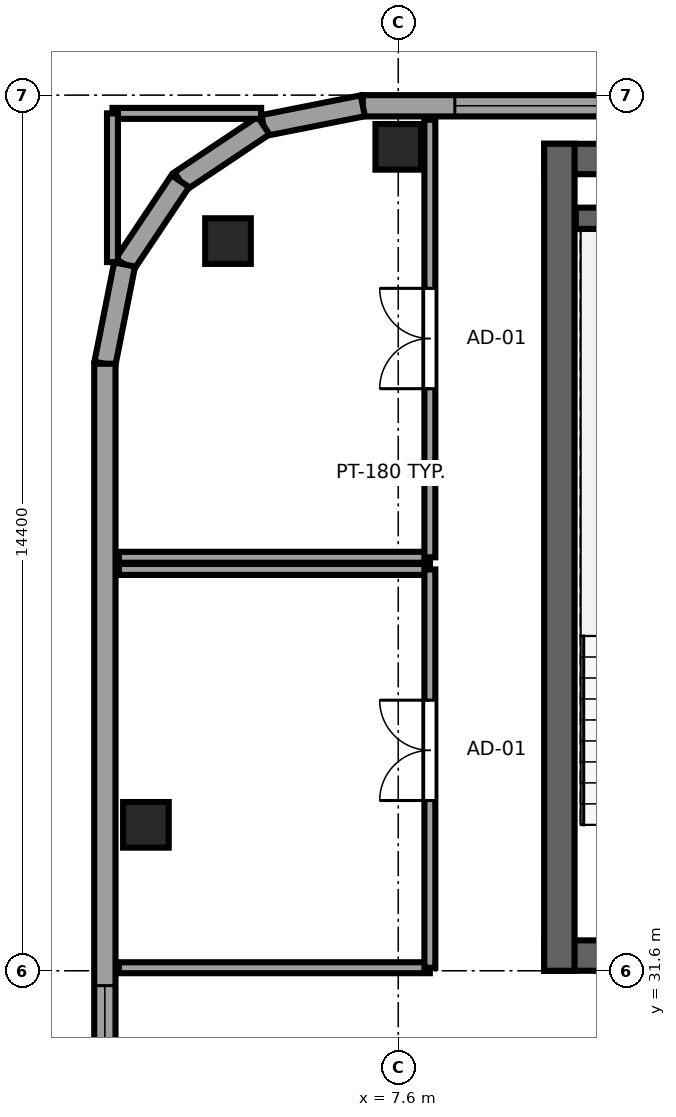
"""IFC4 building model, lengths in metres.
Left out: names, types, materials, properties, quantities, classifications, styles, units other than length and angle.
Written with IfcOpenShell. Run it as: python <this file> out.ifc"""

import sys

from ifc_helpers import new_model, si_unit, direction, frame, frame_2d, origin, origin_2d, place, context, subcontext, project, spatial, rectangle, extrude, source, transform, mapped, element, fill, save


model = new_model("IFC4")
c1 = context("Model", 3, precision=1e-05, world=origin(), true_north=direction((0.0, 1.0)))
c2 = subcontext(c1, "Body", "Model", "MODEL_VIEW")
j1 = project(units=[si_unit("LENGTHUNIT", "METRE"), si_unit("PLANEANGLEUNIT", "RADIAN")], contexts=[c1])
p1 = place(None, origin())
s1 = spatial("IfcSite", under=j1, at=p1, CompositionType="ELEMENT")
p2 = place(p1, origin())
s2 = spatial("IfcBuilding", under=s1, at=p2, CompositionType="ELEMENT")
p3 = place(p2, frame((0.0, 0.0, 213.25)))
s3 = spatial("IfcBuildingStorey", under=s2, at=p3, CompositionType="ELEMENT", Elevation=213.25)
p4 = place(p3, frame((10.0, 31.85, 0.0), z_axis=(0.0, 0.0, 1.0), x_axis=(1.0, 0.0, 0.0)))
e1 = element("IfcWall", 1, at=p4, inside=s3, PredefinedType="SHEAR", context=c2, shape_type="SweptSolid", body=[
    extrude(rectangle(XDim=26.0, YDim=0.5, at=frame_2d((13.0, 0.0))), origin(), (0.0, 0.0, 1.0), 3.55),
])
p5 = place(p4, frame((7.45, 0.0, 0.0), z_axis=(0.0, 0.0, 1.0), x_axis=(-1.0, 0.0, 0.0)))
e2 = element("IfcOpeningElement", 2, at=p5, cuts=e1, PredefinedType="OPENING", context=c2, shape_type="SweptSolid", body=[
    extrude(rectangle(XDim=1.5, YDim=2.04, at=frame_2d((0.75, 1.02))), frame((0.0, 0.26, 0.0), z_axis=(0.0, -1.0, 0.0), x_axis=(1.0, 0.0, 0.0)), (0.0, 0.0, 1.0), 0.52),
])
p6 = place(p4, frame((13.75, 0.0, 0.0), z_axis=(0.0, 0.0, 1.0), x_axis=(-1.0, 0.0, 0.0)))
e3 = element("IfcOpeningElement", 3, at=p6, cuts=e1, PredefinedType="OPENING", context=c2, shape_type="SweptSolid", body=[
    extrude(rectangle(XDim=1.5, YDim=2.04, at=frame_2d((0.75, 1.02))), frame((0.0, 0.26, 0.0), z_axis=(0.0, -1.0, 0.0), x_axis=(1.0, 0.0, 0.0)), (0.0, 0.0, 1.0), 0.52),
])
p7 = place(p4, frame((20.05, 0.0, 0.0), z_axis=(0.0, 0.0, 1.0), x_axis=(-1.0, 0.0, 0.0)))
e4 = element("IfcOpeningElement", 4, at=p7, cuts=e1, PredefinedType="OPENING", context=c2, shape_type="SweptSolid", body=[
    extrude(rectangle(XDim=1.5, YDim=2.04, at=frame_2d((0.75, 1.02))), frame((0.0, 0.26, 0.0), z_axis=(0.0, -1.0, 0.0), x_axis=(1.0, 0.0, 0.0)), (0.0, 0.0, 1.0), 0.52),
])
p8 = place(p3, frame((10.0, 44.95, 0.0), z_axis=(0.0, 0.0, 1.0), x_axis=(1.0, 0.0, 0.0)))
e5 = element("IfcWall", 5, at=p8, inside=s3, PredefinedType="SHEAR", context=c2, shape_type="SweptSolid", body=[
    extrude(rectangle(XDim=26.0, YDim=0.5, at=frame_2d((13.0, 0.0))), origin(), (0.0, 0.0, 1.0), 3.55),
])
p9 = place(p3, frame((10.25, 31.6, 0.0), z_axis=(0.0, 0.0, 1.0), x_axis=(0.0, 1.0, 0.0)))
e6 = element("IfcWall", 6, at=p9, inside=s3, PredefinedType="SHEAR", context=c2, shape_type="SweptSolid", body=[
    extrude(rectangle(XDim=13.6, YDim=0.5, at=frame_2d((6.8, 0.0))), origin(), (0.0, 0.0, 1.0), 3.55),
])
p10 = place(p3, frame((10.52, 43.975, 0.0), z_axis=(0.0, 0.0, 1.0), x_axis=(1.0, 0.0, 0.0)))
e7 = element("IfcWall", 7, at=p10, inside=s3, PredefinedType="SHEAR", context=c2, shape_type="SweptSolid", body=[
    extrude(rectangle(XDim=3.6, YDim=0.35, at=frame_2d((1.8, 0.0))), origin(), (0.0, 0.0, 1.0), 3.55),
])
m1 = source(origin(), c2, "Body", "SweptSolid", [
    extrude(rectangle(XDim=0.75, YDim=0.75, at=origin_2d()), origin(), (0.0, 0.0, 1.0), 3.55),
])
for number, where, z_axis, x_axis in (
    (8, (4.8, 43.6, 0.0), (0.0, 0.0, 1.0), (1.0, 0.0, 0.0)),
    (9, (7.6, 45.15, 0.0), (0.0, 0.0, 1.0), (1.0, 0.0, 0.0)),
    (10, (3.45, 34.0, 0.0), (0.0, 0.0, 1.0), (1.0, 0.0, 0.0)),
):
    element("IfcColumn", number, at=place(p3, frame(where, z_axis=z_axis, x_axis=x_axis)), inside=s3, PredefinedType="COLUMN", context=c2, shape_type="MappedRepresentation", body=[
        mapped(m1, transform((0.0, 0.0, 0.0), x_axis=(1.0, 0.0, 0.0), y_axis=(0.0, 1.0, 0.0), z_axis=(0.0, 0.0, 1.0), scale=1.0)),
    ])
p11 = place(p3, frame((35.383, 45.825, 0.0), z_axis=(0.0, 0.0, 1.0), x_axis=(-1.0, 0.0, 0.0)))
e11 = element("IfcWall", 11, at=p11, inside=s3, PredefinedType="SOLIDWALL", context=c2, shape_type="SweptSolid", body=[
    extrude(rectangle(XDim=28.366, YDim=0.35, at=frame_2d((14.183, 0.0))), origin(), (0.0, 0.0, 1.0), 3.37),
])
p12 = place(p11, frame((1.514, 0.0, 0.68)))
e12 = element("IfcOpeningElement", 12, at=p12, cuts=e11, PredefinedType="OPENING", context=c2, shape_type="SweptSolid", body=[
    extrude(rectangle(XDim=2.7, YDim=1.95, at=frame_2d((1.35, 0.975))), frame((0.0, 0.185, 0.0), z_axis=(0.0, -1.0, 0.0), x_axis=(1.0, 0.0, 0.0)), (0.0, 0.0, 1.0), 0.37),
])
p13 = place(p11, frame((6.041, 0.0, 0.68)))
e13 = element("IfcOpeningElement", 13, at=p13, cuts=e11, PredefinedType="OPENING", context=c2, shape_type="SweptSolid", body=[
    extrude(rectangle(XDim=2.7, YDim=1.95, at=frame_2d((1.35, 0.975))), frame((0.0, 0.185, 0.0), z_axis=(0.0, -1.0, 0.0), x_axis=(1.0, 0.0, 0.0)), (0.0, 0.0, 1.0), 0.37),
])
p14 = place(p11, frame((10.569, 0.0, 0.68)))
e14 = element("IfcOpeningElement", 14, at=p14, cuts=e11, PredefinedType="OPENING", context=c2, shape_type="SweptSolid", body=[
    extrude(rectangle(XDim=2.7, YDim=1.95, at=frame_2d((1.35, 0.975))), frame((0.0, 0.185, 0.0), z_axis=(0.0, -1.0, 0.0), x_axis=(1.0, 0.0, 0.0)), (0.0, 0.0, 1.0), 0.37),
])
p15 = place(p11, frame((15.097, 0.0, 0.68)))
e15 = element("IfcOpeningElement", 15, at=p15, cuts=e11, PredefinedType="OPENING", context=c2, shape_type="SweptSolid", body=[
    extrude(rectangle(XDim=2.7, YDim=1.95, at=frame_2d((1.35, 0.975))), frame((0.0, 0.185, 0.0), z_axis=(0.0, -1.0, 0.0), x_axis=(1.0, 0.0, 0.0)), (0.0, 0.0, 1.0), 0.37),
])
p16 = place(p11, frame((19.624, 0.0, 0.68)))
e16 = element("IfcOpeningElement", 16, at=p16, cuts=e11, PredefinedType="OPENING", context=c2, shape_type="SweptSolid", body=[
    extrude(rectangle(XDim=2.7, YDim=1.95, at=frame_2d((1.35, 0.975))), frame((0.0, 0.185, 0.0), z_axis=(0.0, -1.0, 0.0), x_axis=(1.0, 0.0, 0.0)), (0.0, 0.0, 1.0), 0.37),
])
p17 = place(p11, frame((24.152, 0.0, 0.68)))
e17 = element("IfcOpeningElement", 17, at=p17, cuts=e11, PredefinedType="OPENING", context=c2, shape_type="SweptSolid", body=[
    extrude(rectangle(XDim=2.7, YDim=1.95, at=frame_2d((1.35, 0.975))), frame((0.0, 0.185, 0.0), z_axis=(0.0, -1.0, 0.0), x_axis=(1.0, 0.0, 0.0)), (0.0, 0.0, 1.0), 0.37),
])
p18 = place(p3, frame((7.017, 45.825, 0.0), z_axis=(0.0, 0.0, 1.0), x_axis=(-0.980788844421, -0.195072403631, 0.0)))
e18 = element("IfcWall", 18, at=p18, inside=s3, PredefinedType="SOLIDWALL", context=c2, shape_type="SweptSolid", body=[
    extrude(rectangle(XDim=1.665, YDim=0.35, at=frame_2d((0.832, 0.0))), origin(), (0.0, 0.0, 1.0), 3.37),
])
for number, where, z_axis, x_axis in (
    (19, (5.385, 45.5, 0.0), (0.0, 0.0, 1.0), (-0.832, -0.556, 0.0)),
    (20, (4.015, 44.585, 0.0), (0.0, 0.0, 1.0), (-0.556, -0.831, 0.0)),
):
    element("IfcWall", number, at=place(p3, frame(where, z_axis=z_axis, x_axis=x_axis)), inside=s3, PredefinedType="SOLIDWALL", context=c2, shape_type="SweptSolid", body=[
        extrude(rectangle(XDim=1.647, YDim=0.35, at=frame_2d((0.824, 0.0))), origin(), (0.0, 0.0, 1.0), 2.9),
    ])
p19 = place(p3, frame((3.1, 43.216, 0.0), z_axis=(0.0, 0.0, 1.0), x_axis=(-0.195044345786, -0.980794424524, 0.0)))
e21 = element("IfcWall", 21, at=p19, inside=s3, PredefinedType="SOLIDWALL", context=c2, shape_type="SweptSolid", body=[
    extrude(rectangle(XDim=1.665, YDim=0.35, at=frame_2d((0.833, 0.0))), origin(), (0.0, 0.0, 1.0), 3.37),
])
p20 = place(p3, frame((2.775, 41.583, 0.0), z_axis=(0.0, 0.0, 1.0), x_axis=(0.0, -1.0, 0.0)))
e22 = element("IfcWall", 22, at=p20, inside=s3, PredefinedType="SOLIDWALL", context=c2, shape_type="SweptSolid", body=[
    extrude(rectangle(XDim=34.566, YDim=0.35, at=frame_2d((17.283, 0.0))), origin(), (0.0, 0.0, 1.0), 3.37),
])
p21 = place(p20, frame((10.227, 0.0, 0.68)))
e23 = element("IfcOpeningElement", 23, at=p21, cuts=e22, PredefinedType="OPENING", context=c2, shape_type="SweptSolid", body=[
    extrude(rectangle(XDim=2.7, YDim=1.95, at=frame_2d((1.35, 0.975))), frame((0.0, 0.185, 0.0), z_axis=(0.0, -1.0, 0.0), x_axis=(1.0, 0.0, 0.0)), (0.0, 0.0, 1.0), 0.37),
])
p22 = place(p20, frame((22.189, 0.0, 0.68)))
e24 = element("IfcOpeningElement", 24, at=p22, cuts=e22, PredefinedType="OPENING", context=c2, shape_type="SweptSolid", body=[
    extrude(rectangle(XDim=2.7, YDim=1.95, at=frame_2d((1.35, 0.975))), frame((0.0, 0.185, 0.0), z_axis=(0.0, -1.0, 0.0), x_axis=(1.0, 0.0, 0.0)), (0.0, 0.0, 1.0), 0.37),
])
p23 = place(p20, frame((26.36, 0.0, 0.68)))
e25 = element("IfcOpeningElement", 25, at=p23, cuts=e22, PredefinedType="OPENING", context=c2, shape_type="SweptSolid", body=[
    extrude(rectangle(XDim=2.7, YDim=1.95, at=frame_2d((1.35, 0.975))), frame((0.0, 0.185, 0.0), z_axis=(0.0, -1.0, 0.0), x_axis=(1.0, 0.0, 0.0)), (0.0, 0.0, 1.0), 0.37),
])
p24 = place(p20, frame((29.48, 0.0, 0.68)))
e26 = element("IfcOpeningElement", 26, at=p24, cuts=e22, PredefinedType="OPENING", context=c2, shape_type="SweptSolid", body=[
    extrude(rectangle(XDim=2.7, YDim=1.95, at=frame_2d((1.35, 0.975))), frame((0.0, 0.185, 0.0), z_axis=(0.0, -1.0, 0.0), x_axis=(1.0, 0.0, 0.0)), (0.0, 0.0, 1.0), 0.37),
])
p25 = place(p20, frame((16.683, 0.0, 0.62)))
e27 = element("IfcOpeningElement", 27, at=p25, cuts=e22, PredefinedType="OPENING", context=c2, shape_type="SweptSolid", body=[
    extrude(rectangle(XDim=1.5, YDim=1.55, at=frame_2d((0.75, 0.775))), frame((0.0, 0.185, 0.0), z_axis=(0.0, -1.0, 0.0), x_axis=(1.0, 0.0, 0.0)), (0.0, 0.0, 1.0), 0.37),
])
for number, where, z_axis, x_axis in (
    (28, (3.005, 31.65, 0.0), (0.0, 0.0, 1.0), (1.0, 0.0, 0.0)),
    (29, (3.005, 38.2, 0.0), (0.0, 0.0, 1.0), (1.0, 0.0, 0.0)),
):
    element("IfcWall", number, at=place(p3, frame(where, z_axis=z_axis, x_axis=x_axis)), inside=s3, PredefinedType="PARTITIONING", context=c2, shape_type="SweptSolid", body=[
        extrude(rectangle(XDim=5.115, YDim=0.18, at=frame_2d((2.558, 0.0))), origin(), (0.0, 0.0, 1.0), 3.37),
    ])
p26 = place(p3, frame((8.12, 31.65, 0.0), z_axis=(0.0, 0.0, 1.0), x_axis=(0.0, 1.0, 0.0)))
e30 = element("IfcWall", 30, at=p26, inside=s3, PredefinedType="PARTITIONING", context=c2, shape_type="SweptSolid", body=[
    extrude(rectangle(XDim=6.55, YDim=0.18, at=frame_2d((3.275, 0.0))), origin(), (0.0, 0.0, 1.0), 3.37),
])
p27 = place(p26, frame((2.75, 0.0, 0.0)))
e31 = element("IfcOpeningElement", 31, at=p27, cuts=e30, PredefinedType="OPENING", context=c2, shape_type="SweptSolid", body=[
    extrude(rectangle(XDim=1.65, YDim=2.15, at=frame_2d((0.825, 1.075))), frame((0.0, 0.1, 0.0), z_axis=(0.0, -1.0, 0.0), x_axis=(1.0, 0.0, 0.0)), (0.0, 0.0, 1.0), 0.2),
])
p28 = place(p3, frame((3.005, 38.4, 0.0), z_axis=(0.0, 0.0, 1.0), x_axis=(1.0, 0.0, 0.0)))
e32 = element("IfcWall", 32, at=p28, inside=s3, PredefinedType="PARTITIONING", context=c2, shape_type="SweptSolid", body=[
    extrude(rectangle(XDim=5.115, YDim=0.18, at=frame_2d((2.558, 0.0))), origin(), (0.0, 0.0, 1.0), 3.37),
])
for number, where, z_axis, x_axis in (
    (33, (2.9, 45.7, 0.0), (0.0, 0.0, 1.0), (1.0, 0.0, 0.0)),
    (34, (2.9, 43.255, 0.0), (0.0, 0.0, 1.0), (0.0, 1.0, 0.0)),
):
    element("IfcWall", number, at=place(p3, frame(where, z_axis=z_axis, x_axis=x_axis)), inside=s3, PredefinedType="PARTITIONING", context=c2, shape_type="SweptSolid", body=[
        extrude(rectangle(XDim=2.445, YDim=0.18, at=frame_2d((1.223, 0.0))), origin(), (0.0, 0.0, 1.0), 3.37),
    ])
p29 = place(p3, frame((8.12, 38.4, 0.0), z_axis=(0.0, 0.0, 1.0), x_axis=(0.0, 1.0, 0.0)))
e35 = element("IfcWall", 35, at=p29, inside=s3, PredefinedType="PARTITIONING", context=c2, shape_type="SweptSolid", body=[
    extrude(rectangle(XDim=7.195, YDim=0.18, at=frame_2d((3.598, 0.0))), origin(), (0.0, 0.0, 1.0), 3.37),
])
p30 = place(p29, frame((2.772, 0.0, 0.0)))
e36 = element("IfcOpeningElement", 36, at=p30, cuts=e35, PredefinedType="OPENING", context=c2, shape_type="SweptSolid", body=[
    extrude(rectangle(XDim=1.65, YDim=2.15, at=frame_2d((0.825, 1.075))), frame((0.0, 0.1, 0.0), z_axis=(0.0, -1.0, 0.0), x_axis=(1.0, 0.0, 0.0)), (0.0, 0.0, 1.0), 0.2),
])
m2 = source(origin(), c2, "Body", "SweptSolid", [
    extrude(rectangle(XDim=2.7, YDim=1.95, at=frame_2d((1.35, 0.975))), frame((0.0, 0.09, 0.0), z_axis=(0.0, -1.0, 0.0), x_axis=(1.0, 0.0, 0.0)), (0.0, 0.0, 1.0), 0.06),
])
p31 = place(p17, origin())
e37 = element("IfcWindow", 37, at=p31, inside=s3, PartitioningType="TRIPLE_PANEL_HORIZONTAL", PredefinedType="WINDOW", context=c2, shape_type="MappedRepresentation", body=[
    mapped(m2, transform((0.0, 0.0, 0.0), x_axis=(1.0, 0.0, 0.0), y_axis=(0.0, 1.0, 0.0), z_axis=(0.0, 0.0, 1.0), scale=1.0)),
])
fill(e17, e37)
p32 = place(p21, origin())
e38 = element("IfcWindow", 38, at=p32, inside=s3, PartitioningType="TRIPLE_PANEL_HORIZONTAL", PredefinedType="WINDOW", context=c2, shape_type="MappedRepresentation", body=[
    mapped(m2, transform((0.0, 0.0, 0.0), x_axis=(1.0, 0.0, 0.0), y_axis=(0.0, 1.0, 0.0), z_axis=(0.0, 0.0, 1.0), scale=1.0)),
])
fill(e23, e38)
m3 = source(origin(), c2, "Body", "SweptSolid", [
    extrude(rectangle(XDim=1.65, YDim=2.15, at=frame_2d((0.825, 1.075))), frame((0.0, 0.025, 0.0), z_axis=(0.0, -1.0, 0.0), x_axis=(1.0, 0.0, 0.0)), (0.0, 0.0, 1.0), 0.05),
])
p33 = place(p27, origin())
e39 = element("IfcDoor", 39, at=p33, inside=s3, OperationType="DOUBLE_DOOR_SINGLE_SWING", PredefinedType="DOOR", context=c2, shape_type="MappedRepresentation", body=[
    mapped(m3, transform((0.0, 0.0, 0.0), x_axis=(1.0, 0.0, 0.0), y_axis=(0.0, 1.0, 0.0), z_axis=(0.0, 0.0, 1.0), scale=1.0)),
])
fill(e31, e39)
p34 = place(p30, origin())
e40 = element("IfcDoor", 40, at=p34, inside=s3, OperationType="DOUBLE_DOOR_SINGLE_SWING", PredefinedType="DOOR", context=c2, shape_type="MappedRepresentation", body=[
    mapped(m3, transform((0.0, 0.0, 0.0), x_axis=(1.0, 0.0, 0.0), y_axis=(0.0, 1.0, 0.0), z_axis=(0.0, 0.0, 1.0), scale=1.0)),
])
fill(e36, e40)
save(model, sys.argv[1])
